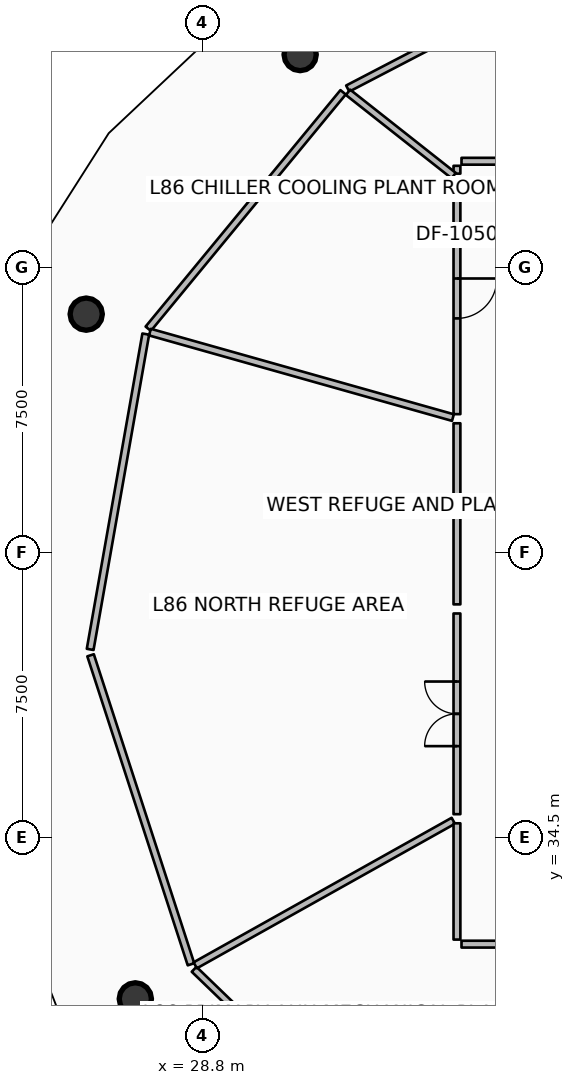
"""IFC4 building model, lengths in metres.
Left out: names, types, materials, properties, quantities, classifications, styles, units other than length and angle.
Written with IfcOpenShell. Run it as: python <this file> out.ifc"""

import sys

from ifc_helpers import new_model, si_unit, direction, frame, frame_2d, origin, origin_2d, place, context, subcontext, project, spatial, rectangle, circle, extrude, element, fill, save


model = new_model("IFC4")
c1 = context("Model", 3, precision=1e-05, world=origin(), true_north=direction((0.0, 1.0)))
c2 = subcontext(c1, "Body", "Model", "MODEL_VIEW")
j1 = project(units=[si_unit("LENGTHUNIT", "METRE"), si_unit("PLANEANGLEUNIT", "RADIAN")], contexts=[c1])
p1 = place(None, origin())
s1 = spatial("IfcSite", under=j1, at=p1, CompositionType="ELEMENT")
p2 = place(p1, origin())
s2 = spatial("IfcBuilding", under=s1, at=p2, CompositionType="ELEMENT")
p3 = place(p2, frame((0.0, 0.0, 343.1)))
s3 = spatial("IfcBuildingStorey", under=s2, at=p3, CompositionType="ELEMENT", Elevation=343.1)
for number, where, z_axis, x_axis in (
    (1, (31.374, 55.107, 0.0), (0.0, 0.0, 1.0), (1.0, 0.0, 0.0)),
    (2, (25.744, 48.277, 0.0), (0.0, 0.0, 1.0), (1.0, 0.0, 0.0)),
    (3, (27.037, 30.26, 0.0), (0.0, 0.0, 1.0), (1.0, 0.0, 0.0)),
):
    element("IfcColumn", number, at=place(p3, frame(where, z_axis=z_axis, x_axis=x_axis)), inside=s3, PredefinedType="COLUMN", context=c2, shape_type="SweptSolid", body=[
        extrude(circle(Radius=0.425, at=origin_2d()), origin(), (0.0, 0.0, 1.0), 3.94),
    ])
p4 = place(p3, frame((39.163, 57.617, 0.0), z_axis=(0.0, 0.0, 1.0), x_axis=(-0.886951970108, -0.461861670548, 0.0)))
e4 = element("IfcWall", 4, at=p4, inside=s3, PredefinedType="PARTITIONING", context=c2, shape_type="SweptSolid", body=[
    extrude(rectangle(XDim=7.37, YDim=0.18, at=frame_2d((3.685, 0.0))), origin(), (0.0, 0.0, 1.0), 2.933),
])
p5 = place(p3, frame((32.504, 54.114, 0.0), z_axis=(0.0, 0.0, 1.0), x_axis=(-0.635999094609, -0.771689802743, 0.0)))
e5 = element("IfcWall", 5, at=p5, inside=s3, PredefinedType="PARTITIONING", context=c2, shape_type="SweptSolid", body=[
    extrude(rectangle(XDim=8.062, YDim=0.18, at=frame_2d((4.031, 0.0))), origin(), (0.0, 0.0, 1.0), 2.933),
])
p6 = place(p3, frame((27.312, 47.752, 0.0), z_axis=(0.0, 0.0, 1.0), x_axis=(-0.173644811024, -0.984808346636, 0.0)))
e6 = element("IfcWall", 6, at=p6, inside=s3, PredefinedType="PARTITIONING", context=c2, shape_type="SweptSolid", body=[
    extrude(rectangle(XDim=8.425, YDim=0.18, at=frame_2d((4.212, 0.0))), origin(), (0.0, 0.0, 1.0), 2.933),
])
p7 = place(p3, frame((25.859, 39.301, 0.0), z_axis=(0.0, 0.0, 1.0), x_axis=(0.309030537088, -0.951052115894, 0.0)))
e7 = element("IfcWall", 7, at=p7, inside=s3, PredefinedType="PARTITIONING", context=c2, shape_type="SweptSolid", body=[
    extrude(rectangle(XDim=8.549, YDim=0.18, at=frame_2d((4.274, 0.0))), origin(), (0.0, 0.0, 1.0), 2.933),
])
p8 = place(p3, frame((28.583, 31.038, 0.0), z_axis=(0.0, 0.0, 1.0), x_axis=(0.719358516059, -0.694638989241, 0.0)))
e8 = element("IfcWall", 8, at=p8, inside=s3, PredefinedType="PARTITIONING", context=c2, shape_type="SweptSolid", body=[
    extrude(rectangle(XDim=8.425, YDim=0.18, at=frame_2d((4.212, 0.0))), origin(), (0.0, 0.0, 1.0), 2.933),
])
p9 = place(p3, frame((42.112, 52.3, 0.0), z_axis=(0.0, 0.0, 1.0), x_axis=(-1.0, 0.0, 0.0)))
e9 = element("IfcWall", 9, at=p9, inside=s3, PredefinedType="PARTITIONING", context=c2, shape_type="SweptSolid", body=[
    extrude(rectangle(XDim=6.492, YDim=0.18, at=frame_2d((3.246, 0.0))), origin(), (0.0, 0.0, 1.0), 2.933),
])
p10 = place(p9, frame((2.396, 0.0, 0.0)))
e10 = element("IfcOpeningElement", 10, at=p10, cuts=e9, PredefinedType="OPENING", context=c2, shape_type="SweptSolid", body=[
    extrude(rectangle(XDim=1.7, YDim=2.15, at=frame_2d((0.85, 1.075))), frame((0.0, 0.1, 0.0), z_axis=(0.0, -1.0, 0.0), x_axis=(1.0, 0.0, 0.0)), (0.0, 0.0, 1.0), 0.2),
])
p11 = place(p3, frame((35.5, 52.18, 0.0), z_axis=(0.0, 0.0, 1.0), x_axis=(0.0, -1.0, 0.0)))
e11 = element("IfcWall", 11, at=p11, inside=s3, PredefinedType="PARTITIONING", context=c2, shape_type="SweptSolid", body=[
    extrude(rectangle(XDim=0.206, YDim=0.18, at=frame_2d((0.103, 0.0))), origin(), (0.0, 0.0, 1.0), 2.933),
])
p12 = place(p3, frame((35.414, 51.922, 0.0), z_axis=(0.0, 0.0, 1.0), x_axis=(-0.78533621982, 0.619069480622, 0.0)))
e12 = element("IfcWall", 12, at=p12, inside=s3, PredefinedType="PARTITIONING", context=c2, shape_type="SweptSolid", body=[
    extrude(rectangle(XDim=3.54, YDim=0.18, at=frame_2d((1.77, 0.0))), origin(), (0.0, 0.0, 1.0), 2.933),
])
p13 = place(p3, frame((35.5, 51.734, 0.0), z_axis=(0.0, 0.0, 1.0), x_axis=(0.0, -1.0, 0.0)))
e13 = element("IfcWall", 13, at=p13, inside=s3, PredefinedType="PARTITIONING", context=c2, shape_type="SweptSolid", body=[
    extrude(rectangle(XDim=6.089, YDim=0.18, at=frame_2d((3.044, 0.0))), origin(), (0.0, 0.0, 1.0), 2.933),
])
p14 = place(p13, frame((2.519, 0.0, 0.0)))
e14 = element("IfcOpeningElement", 14, at=p14, cuts=e13, PredefinedType="OPENING", context=c2, shape_type="SweptSolid", body=[
    extrude(rectangle(XDim=1.05, YDim=2.1, at=frame_2d((0.525, 1.05))), frame((0.0, 0.1, 0.0), z_axis=(0.0, -1.0, 0.0), x_axis=(1.0, 0.0, 0.0)), (0.0, 0.0, 1.0), 0.2),
])
p15 = place(p3, frame((35.394, 45.555, 0.0), z_axis=(0.0, 0.0, 1.0), x_axis=(-0.962460337435, 0.2714223625, 0.0)))
e15 = element("IfcWall", 15, at=p15, inside=s3, PredefinedType="PARTITIONING", context=c2, shape_type="SweptSolid", body=[
    extrude(rectangle(XDim=8.283, YDim=0.18, at=frame_2d((4.142, 0.0))), origin(), (0.0, 0.0, 1.0), 2.933),
])
p16 = place(p3, frame((35.5, 45.406, 0.0), z_axis=(0.0, 0.0, 1.0), x_axis=(0.0, -1.0, 0.0)))
e16 = element("IfcWall", 16, at=p16, inside=s3, PredefinedType="PARTITIONING", context=c2, shape_type="SweptSolid", body=[
    extrude(rectangle(XDim=4.765, YDim=0.18, at=frame_2d((2.383, 0.0))), origin(), (0.0, 0.0, 1.0), 2.933),
])
p17 = place(p3, frame((35.5, 40.4, 0.0), z_axis=(0.0, 0.0, 1.0), x_axis=(0.0, -1.0, 0.0)))
e17 = element("IfcWall", 17, at=p17, inside=s3, PredefinedType="PARTITIONING", context=c2, shape_type="SweptSolid", body=[
    extrude(rectangle(XDim=5.281, YDim=0.18, at=frame_2d((2.64, 0.0))), origin(), (0.0, 0.0, 1.0), 2.933),
])
p18 = place(p17, frame((1.79, 0.0, 0.0)))
e18 = element("IfcOpeningElement", 18, at=p18, cuts=e17, PredefinedType="OPENING", context=c2, shape_type="SweptSolid", body=[
    extrude(rectangle(XDim=1.7, YDim=2.15, at=frame_2d((0.85, 1.075))), frame((0.0, 0.1, 0.0), z_axis=(0.0, -1.0, 0.0), x_axis=(1.0, 0.0, 0.0)), (0.0, 0.0, 1.0), 0.2),
])
p19 = place(p3, frame((35.404, 34.946, 0.0), z_axis=(0.0, 0.0, 1.0), x_axis=(-0.872492108865, -0.488628202182, 0.0)))
e19 = element("IfcWall", 19, at=p19, inside=s3, PredefinedType="PARTITIONING", context=c2, shape_type="SweptSolid", body=[
    extrude(rectangle(XDim=7.783, YDim=0.18, at=frame_2d((3.892, 0.0))), origin(), (0.0, 0.0, 1.0), 2.933),
])
p20 = place(p3, frame((35.5, 34.88, 0.0), z_axis=(0.0, 0.0, 1.0), x_axis=(0.0, -1.0, 0.0)))
e20 = element("IfcWall", 20, at=p20, inside=s3, PredefinedType="PARTITIONING", context=c2, shape_type="SweptSolid", body=[
    extrude(rectangle(XDim=3.06, YDim=0.18, at=frame_2d((1.53, 0.0))), origin(), (0.0, 0.0, 1.0), 2.933),
])
p21 = place(p3, frame((35.62, 31.7, 0.0), z_axis=(0.0, 0.0, 1.0), x_axis=(1.0, 0.0, 0.0)))
e21 = element("IfcWall", 21, at=p21, inside=s3, PredefinedType="PARTITIONING", context=c2, shape_type="SweptSolid", body=[
    extrude(rectangle(XDim=4.14, YDim=0.18, at=frame_2d((2.07, 0.0))), origin(), (0.0, 0.0, 1.0), 2.933),
])
p22 = place(p21, frame((1.545, 0.0, 0.0)))
e22 = element("IfcOpeningElement", 22, at=p22, cuts=e21, PredefinedType="OPENING", context=c2, shape_type="SweptSolid", body=[
    extrude(rectangle(XDim=1.05, YDim=2.1, at=frame_2d((0.525, 1.05))), frame((0.0, 0.1, 0.0), z_axis=(0.0, -1.0, 0.0), x_axis=(1.0, 0.0, 0.0)), (0.0, 0.0, 1.0), 0.2),
])
p23 = place(p3, frame((39.812, 31.614, 0.0), z_axis=(0.0, 0.0, 1.0), x_axis=(-0.619086016157, -0.785323184809, 0.0)))
e23 = element("IfcWall", 23, at=p23, inside=s3, PredefinedType="PARTITIONING", context=c2, shape_type="SweptSolid", body=[
    extrude(rectangle(XDim=8.155, YDim=0.18, at=frame_2d((4.078, 0.0))), origin(), (0.0, 0.0, 1.0), 2.933),
])
p24 = place(p14, origin())
e24 = element("IfcDoor", 24, at=p24, inside=s3, OperationType="SINGLE_SWING_LEFT", PredefinedType="DOOR", context=c2, shape_type="SweptSolid", body=[
    extrude(rectangle(XDim=1.05, YDim=2.1, at=frame_2d((0.525, 1.05))), frame((0.0, 0.025, 0.0), z_axis=(0.0, -1.0, 0.0), x_axis=(1.0, 0.0, 0.0)), (0.0, 0.0, 1.0), 0.05),
])
fill(e14, e24)
p25 = place(p18, origin())
e25 = element("IfcDoor", 25, at=p25, inside=s3, OperationType="DOUBLE_DOOR_SINGLE_SWING", PredefinedType="DOOR", context=c2, shape_type="SweptSolid", body=[
    extrude(rectangle(XDim=1.7, YDim=2.15, at=frame_2d((0.85, 1.075))), frame((0.0, 0.025, 0.0), z_axis=(0.0, -1.0, 0.0), x_axis=(1.0, 0.0, 0.0)), (0.0, 0.0, 1.0), 0.05),
])
fill(e18, e25)
save(model, sys.argv[1])
